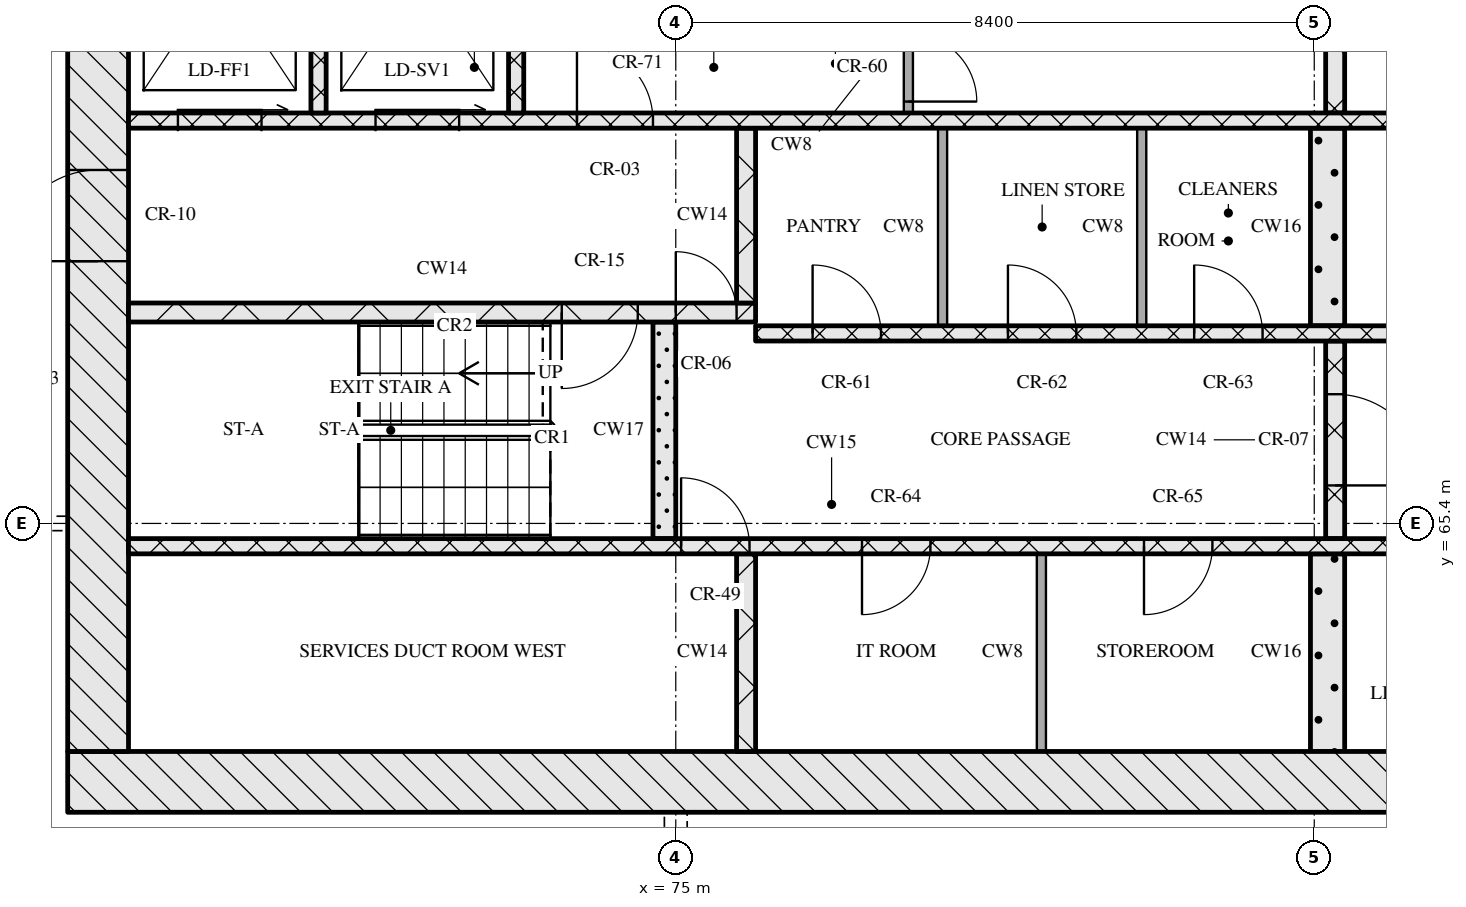
"""IFC4 building model, lengths in metres.
Left out: names, types, materials, properties, quantities, classifications, styles, units other than length and angle.
Written with IfcOpenShell. Run it as: python <this file> out.ifc"""

import sys

from ifc_helpers import new_model, si_unit, direction, frame, frame_2d, origin, place, context, subcontext, project, spatial, rectangle, extrude, element, fill, save


model = new_model("IFC4")
c1 = context("Model", 3, precision=1e-05, world=origin(), true_north=direction((0.0, 1.0)))
c2 = subcontext(c1, "Body", "Model", "MODEL_VIEW")
j1 = project(units=[si_unit("LENGTHUNIT", "METRE"), si_unit("PLANEANGLEUNIT", "RADIAN")], contexts=[c1])
p1 = place(None, origin())
s1 = spatial("IfcSite", under=j1, at=p1, CompositionType="ELEMENT")
p2 = place(p1, origin())
s2 = spatial("IfcBuilding", under=s1, at=p2, CompositionType="ELEMENT")
p3 = place(p2, frame((0.0, 0.0, 179.85)))
s3 = spatial("IfcBuildingStorey", under=s2, at=p3, CompositionType="ELEMENT", Elevation=179.85)
p4 = place(p3, frame((67.0, 62.0, 0.0), z_axis=(0.0, 0.0, 1.0), x_axis=(1.0, 0.0, 0.0)))
e1 = element("IfcWall", 1, at=p4, inside=s3, PredefinedType="SOLIDWALL", context=c2, shape_type="SweptSolid", body=[
    extrude(rectangle(XDim=41.2, YDim=0.8, at=frame_2d((20.6, 0.0))), origin(), (0.0, 0.0, 1.0), 3.32),
])
p5 = place(p4, frame((20.95, 0.0, 0.0)))
e2 = element("IfcOpeningElement", 2, at=p5, cuts=e1, PredefinedType="OPENING", context=c2, shape_type="SweptSolid", body=[
    extrude(rectangle(XDim=1.8, YDim=2.1, at=frame_2d((0.9, 1.05))), frame((0.0, 0.41, 0.0), z_axis=(0.0, -1.0, 0.0), x_axis=(1.0, 0.0, 0.0)), (0.0, 0.0, 1.0), 0.82),
])
p6 = place(p3, frame((67.4, 62.4, 0.0), z_axis=(0.0, 0.0, 1.0), x_axis=(0.0, 1.0, 0.0)))
e3 = element("IfcWall", 3, at=p6, inside=s3, PredefinedType="SOLIDWALL", context=c2, shape_type="SweptSolid", body=[
    extrude(rectangle(XDim=12.0, YDim=0.8, at=frame_2d((6.0, 0.0))), origin(), (0.0, 0.0, 1.0), 3.32),
])
p7 = place(p6, frame((6.45, 0.0, 0.0)))
e4 = element("IfcOpeningElement", 4, at=p7, cuts=e3, PredefinedType="OPENING", context=c2, shape_type="SweptSolid", body=[
    extrude(rectangle(XDim=1.2, YDim=2.1, at=frame_2d((0.6, 1.05))), frame((0.0, 0.41, 0.0), z_axis=(0.0, -1.0, 0.0), x_axis=(1.0, 0.0, 0.0)), (0.0, 0.0, 1.0), 0.82),
])
p8 = place(p3, frame((75.925, 62.4, 0.0), z_axis=(0.0, 0.0, 1.0), x_axis=(0.0, 1.0, 0.0)))
e5 = element("IfcWall", 5, at=p8, inside=s3, PredefinedType="SOLIDWALL", context=c2, shape_type="SweptSolid", body=[
    extrude(rectangle(XDim=2.6, YDim=0.25, at=frame_2d((1.3, 0.0))), origin(), (0.0, 0.0, 1.0), 3.32),
])
p9 = place(p3, frame((79.81, 62.4, 0.0), z_axis=(0.0, 0.0, 1.0), x_axis=(0.0, 1.0, 0.0)))
e6 = element("IfcWall", 6, at=p9, inside=s3, PredefinedType="PARTITIONING", context=c2, shape_type="SweptSolid", body=[
    extrude(rectangle(XDim=2.6, YDim=0.12, at=frame_2d((1.3, 0.0))), origin(), (0.0, 0.0, 1.0), 3.32),
])
p10 = place(p3, frame((83.575, 62.4, 0.0), z_axis=(0.0, 0.0, 1.0), x_axis=(0.0, 1.0, 0.0)))
e7 = element("IfcWall", 7, at=p10, inside=s3, PredefinedType="SOLIDWALL", context=c2, shape_type="SweptSolid", body=[
    extrude(rectangle(XDim=2.6, YDim=0.45, at=frame_2d((1.3, 0.0))), origin(), (0.0, 0.0, 1.0), 3.32),
])
p11 = place(p3, frame((67.8, 65.1, 0.0), z_axis=(0.0, 0.0, 1.0), x_axis=(1.0, 0.0, 0.0)))
e8 = element("IfcWall", 8, at=p11, inside=s3, PredefinedType="SOLIDWALL", context=c2, shape_type="SweptSolid", body=[
    extrude(rectangle(XDim=18.5, YDim=0.2, at=frame_2d((9.25, 0.0))), origin(), (0.0, 0.0, 1.0), 3.32),
])
p12 = place(p11, frame((7.27, 0.0, 0.0)))
e9 = element("IfcOpeningElement", 9, at=p12, cuts=e8, PredefinedType="OPENING", context=c2, shape_type="SweptSolid", body=[
    extrude(rectangle(XDim=0.9, YDim=2.1, at=frame_2d((0.45, 1.05))), frame((0.0, 0.11, 0.0), z_axis=(0.0, -1.0, 0.0), x_axis=(1.0, 0.0, 0.0)), (0.0, 0.0, 1.0), 0.22),
])
p13 = place(p11, frame((9.65, 0.0, 0.0)))
e10 = element("IfcOpeningElement", 10, at=p13, cuts=e8, PredefinedType="OPENING", context=c2, shape_type="SweptSolid", body=[
    extrude(rectangle(XDim=0.9, YDim=2.1, at=frame_2d((0.45, 1.05))), frame((0.0, 0.11, 0.0), z_axis=(0.0, -1.0, 0.0), x_axis=(1.0, 0.0, 0.0)), (0.0, 0.0, 1.0), 0.22),
])
p14 = place(p11, frame((13.36, 0.0, 0.0)))
e11 = element("IfcOpeningElement", 11, at=p14, cuts=e8, PredefinedType="OPENING", context=c2, shape_type="SweptSolid", body=[
    extrude(rectangle(XDim=0.9, YDim=2.1, at=frame_2d((0.45, 1.05))), frame((0.0, 0.11, 0.0), z_axis=(0.0, -1.0, 0.0), x_axis=(1.0, 0.0, 0.0)), (0.0, 0.0, 1.0), 0.22),
])
p15 = place(p11, frame((16.7, 0.0, 0.0)))
e12 = element("IfcOpeningElement", 12, at=p15, cuts=e8, PredefinedType="OPENING", context=c2, shape_type="SweptSolid", body=[
    extrude(rectangle(XDim=0.9, YDim=2.1, at=frame_2d((0.45, 1.05))), frame((0.0, 0.11, 0.0), z_axis=(0.0, -1.0, 0.0), x_axis=(1.0, 0.0, 0.0)), (0.0, 0.0, 1.0), 0.22),
])
p16 = place(p3, frame((74.85, 65.2, 0.0), z_axis=(0.0, 0.0, 1.0), x_axis=(0.0, 1.0, 0.0)))
e13 = element("IfcWall", 13, at=p16, inside=s3, PredefinedType="SOLIDWALL", context=c2, shape_type="SweptSolid", body=[
    extrude(rectangle(XDim=2.85, YDim=0.3, at=frame_2d((1.425, 0.0))), origin(), (0.0, 0.0, 1.0), 3.32),
])
p17 = place(p3, frame((83.675, 65.2, 0.0), z_axis=(0.0, 0.0, 1.0), x_axis=(0.0, 1.0, 0.0)))
e14 = element("IfcWall", 14, at=p17, inside=s3, PredefinedType="SOLIDWALL", context=c2, shape_type="SweptSolid", body=[
    extrude(rectangle(XDim=2.6, YDim=0.25, at=frame_2d((1.3, 0.0))), origin(), (0.0, 0.0, 1.0), 3.32),
])
p18 = place(p17, frame((0.7, 0.0, 0.0)))
e15 = element("IfcOpeningElement", 15, at=p18, cuts=e14, PredefinedType="OPENING", context=c2, shape_type="SweptSolid", body=[
    extrude(rectangle(XDim=1.2, YDim=2.1, at=frame_2d((0.6, 1.05))), frame((0.0, 0.135, 0.0), z_axis=(0.0, -1.0, 0.0), x_axis=(1.0, 0.0, 0.0)), (0.0, 0.0, 1.0), 0.27),
])
p19 = place(p3, frame((76.05, 67.9, 0.0), z_axis=(0.0, 0.0, 1.0), x_axis=(1.0, 0.0, 0.0)))
e16 = element("IfcWall", 16, at=p19, inside=s3, PredefinedType="SOLIDWALL", context=c2, shape_type="SweptSolid", body=[
    extrude(rectangle(XDim=23.1, YDim=0.2, at=frame_2d((11.55, 0.0))), origin(), (0.0, 0.0, 1.0), 3.32),
])
p20 = place(p19, frame((0.75, 0.0, 0.0)))
e17 = element("IfcOpeningElement", 17, at=p20, cuts=e16, PredefinedType="OPENING", context=c2, shape_type="SweptSolid", body=[
    extrude(rectangle(XDim=0.9, YDim=2.1, at=frame_2d((0.45, 1.05))), frame((0.0, 0.11, 0.0), z_axis=(0.0, -1.0, 0.0), x_axis=(1.0, 0.0, 0.0)), (0.0, 0.0, 1.0), 0.22),
])
p21 = place(p19, frame((3.32, 0.0, 0.0)))
e18 = element("IfcOpeningElement", 18, at=p21, cuts=e16, PredefinedType="OPENING", context=c2, shape_type="SweptSolid", body=[
    extrude(rectangle(XDim=0.9, YDim=2.1, at=frame_2d((0.45, 1.05))), frame((0.0, 0.11, 0.0), z_axis=(0.0, -1.0, 0.0), x_axis=(1.0, 0.0, 0.0)), (0.0, 0.0, 1.0), 0.22),
])
p22 = place(p19, frame((5.77, 0.0, 0.0)))
e19 = element("IfcOpeningElement", 19, at=p22, cuts=e16, PredefinedType="OPENING", context=c2, shape_type="SweptSolid", body=[
    extrude(rectangle(XDim=0.9, YDim=2.1, at=frame_2d((0.45, 1.05))), frame((0.0, 0.11, 0.0), z_axis=(0.0, -1.0, 0.0), x_axis=(1.0, 0.0, 0.0)), (0.0, 0.0, 1.0), 0.22),
])
p23 = place(p19, frame((8.45, 0.0, 0.0)))
e20 = element("IfcOpeningElement", 20, at=p23, cuts=e16, PredefinedType="OPENING", context=c2, shape_type="SweptSolid", body=[
    extrude(rectangle(XDim=0.9, YDim=2.1, at=frame_2d((0.45, 1.05))), frame((0.0, 0.11, 0.0), z_axis=(0.0, -1.0, 0.0), x_axis=(1.0, 0.0, 0.0)), (0.0, 0.0, 1.0), 0.22),
])
p24 = place(p19, frame((10.91, 0.0, 0.0)))
e21 = element("IfcOpeningElement", 21, at=p24, cuts=e16, PredefinedType="OPENING", context=c2, shape_type="SweptSolid", body=[
    extrude(rectangle(XDim=0.9, YDim=2.1, at=frame_2d((0.45, 1.05))), frame((0.0, 0.11, 0.0), z_axis=(0.0, -1.0, 0.0), x_axis=(1.0, 0.0, 0.0)), (0.0, 0.0, 1.0), 0.22),
])
p25 = place(p19, frame((13.55, 0.0, 0.0)))
e22 = element("IfcOpeningElement", 22, at=p25, cuts=e16, PredefinedType="OPENING", context=c2, shape_type="SweptSolid", body=[
    extrude(rectangle(XDim=1.0, YDim=2.1, at=frame_2d((0.5, 1.05))), frame((0.0, 0.11, 0.0), z_axis=(0.0, -1.0, 0.0), x_axis=(1.0, 0.0, 0.0)), (0.0, 0.0, 1.0), 0.22),
])
p26 = place(p19, frame((16.2, 0.0, 0.0)))
e23 = element("IfcOpeningElement", 23, at=p26, cuts=e16, PredefinedType="OPENING", context=c2, shape_type="SweptSolid", body=[
    extrude(rectangle(XDim=1.1, YDim=2.1, at=frame_2d((0.55, 1.05))), frame((0.0, 0.11, 0.0), z_axis=(0.0, -1.0, 0.0), x_axis=(1.0, 0.0, 0.0)), (0.0, 0.0, 1.0), 0.22),
])
p27 = place(p19, frame((18.7, 0.0, 0.0)))
e24 = element("IfcOpeningElement", 24, at=p27, cuts=e16, PredefinedType="OPENING", context=c2, shape_type="SweptSolid", body=[
    extrude(rectangle(XDim=1.1, YDim=2.1, at=frame_2d((0.55, 1.05))), frame((0.0, 0.11, 0.0), z_axis=(0.0, -1.0, 0.0), x_axis=(1.0, 0.0, 0.0)), (0.0, 0.0, 1.0), 0.22),
])
p28 = place(p19, frame((21.2, 0.0, 0.0)))
e25 = element("IfcOpeningElement", 25, at=p28, cuts=e16, PredefinedType="OPENING", context=c2, shape_type="SweptSolid", body=[
    extrude(rectangle(XDim=1.1, YDim=2.1, at=frame_2d((0.55, 1.05))), frame((0.0, 0.11, 0.0), z_axis=(0.0, -1.0, 0.0), x_axis=(1.0, 0.0, 0.0)), (0.0, 0.0, 1.0), 0.22),
])
for number, where, z_axis, x_axis in (
    (26, (78.51, 68.0, 0.0), (0.0, 0.0, 1.0), (0.0, 1.0, 0.0)),
    (27, (81.13, 68.0, 0.0), (0.0, 0.0, 1.0), (0.0, 1.0, 0.0)),
):
    element("IfcWall", number, at=place(p3, frame(where, z_axis=z_axis, x_axis=x_axis)), inside=s3, PredefinedType="PARTITIONING", context=c2, shape_type="SweptSolid", body=[
        extrude(rectangle(XDim=2.6, YDim=0.12, at=frame_2d((1.3, 0.0))), origin(), (0.0, 0.0, 1.0), 3.32),
    ])
p29 = place(p3, frame((83.575, 68.0, 0.0), z_axis=(0.0, 0.0, 1.0), x_axis=(0.0, 1.0, 0.0)))
e28 = element("IfcWall", 28, at=p29, inside=s3, PredefinedType="SOLIDWALL", context=c2, shape_type="SweptSolid", body=[
    extrude(rectangle(XDim=2.6, YDim=0.45, at=frame_2d((1.3, 0.0))), origin(), (0.0, 0.0, 1.0), 3.32),
])
p30 = place(p3, frame((67.8, 68.175, 0.0), z_axis=(0.0, 0.0, 1.0), x_axis=(1.0, 0.0, 0.0)))
e29 = element("IfcWall", 29, at=p30, inside=s3, PredefinedType="SOLIDWALL", context=c2, shape_type="SweptSolid", body=[
    extrude(rectangle(XDim=8.25, YDim=0.25, at=frame_2d((4.125, 0.0))), origin(), (0.0, 0.0, 1.0), 3.32),
])
p31 = place(p30, frame((5.7, 0.0, 0.0)))
e30 = element("IfcOpeningElement", 30, at=p31, cuts=e29, PredefinedType="OPENING", context=c2, shape_type="SweptSolid", body=[
    extrude(rectangle(XDim=1.0, YDim=2.1, at=frame_2d((0.5, 1.05))), frame((0.0, 0.135, 0.0), z_axis=(0.0, -1.0, 0.0), x_axis=(1.0, 0.0, 0.0)), (0.0, 0.0, 1.0), 0.27),
])
p32 = place(p30, frame((7.2, 0.0, 0.0)))
e31 = element("IfcOpeningElement", 31, at=p32, cuts=e29, PredefinedType="OPENING", context=c2, shape_type="SweptSolid", body=[
    extrude(rectangle(XDim=0.8, YDim=2.1, at=frame_2d((0.4, 1.05))), frame((0.0, 0.135, 0.0), z_axis=(0.0, -1.0, 0.0), x_axis=(1.0, 0.0, 0.0)), (0.0, 0.0, 1.0), 0.27),
])
p33 = place(p3, frame((75.925, 68.3, 0.0), z_axis=(0.0, 0.0, 1.0), x_axis=(0.0, 1.0, 0.0)))
e32 = element("IfcWall", 32, at=p33, inside=s3, PredefinedType="SOLIDWALL", context=c2, shape_type="SweptSolid", body=[
    extrude(rectangle(XDim=2.3, YDim=0.25, at=frame_2d((1.15, 0.0))), origin(), (0.0, 0.0, 1.0), 3.32),
])
p34 = place(p3, frame((67.8, 70.7, 0.0), z_axis=(0.0, 0.0, 1.0), x_axis=(1.0, 0.0, 0.0)))
e33 = element("IfcWall", 33, at=p34, inside=s3, PredefinedType="SOLIDWALL", context=c2, shape_type="SweptSolid", body=[
    extrude(rectangle(XDim=39.6, YDim=0.2, at=frame_2d((19.8, 0.0))), origin(), (0.0, 0.0, 1.0), 3.32),
])
p35 = place(p34, frame((0.65, 0.0, 0.0)))
e34 = element("IfcOpeningElement", 34, at=p35, cuts=e33, PredefinedType="OPENING", context=c2, shape_type="SweptSolid", body=[
    extrude(rectangle(XDim=1.1, YDim=2.1, at=frame_2d((0.55, 1.05))), frame((0.0, 0.11, 0.0), z_axis=(0.0, -1.0, 0.0), x_axis=(1.0, 0.0, 0.0)), (0.0, 0.0, 1.0), 0.22),
])
p36 = place(p34, frame((3.25, 0.0, 0.0)))
e35 = element("IfcOpeningElement", 35, at=p36, cuts=e33, PredefinedType="OPENING", context=c2, shape_type="SweptSolid", body=[
    extrude(rectangle(XDim=1.1, YDim=2.1, at=frame_2d((0.55, 1.05))), frame((0.0, 0.11, 0.0), z_axis=(0.0, -1.0, 0.0), x_axis=(1.0, 0.0, 0.0)), (0.0, 0.0, 1.0), 0.22),
])
p37 = place(p34, frame((5.9, 0.0, 0.0)))
e36 = element("IfcOpeningElement", 36, at=p37, cuts=e33, PredefinedType="OPENING", context=c2, shape_type="SweptSolid", body=[
    extrude(rectangle(XDim=1.0, YDim=2.1, at=frame_2d((0.5, 1.05))), frame((0.0, 0.11, 0.0), z_axis=(0.0, -1.0, 0.0), x_axis=(1.0, 0.0, 0.0)), (0.0, 0.0, 1.0), 0.22),
])
p38 = place(p34, frame((21.7, 0.0, 0.0)))
e37 = element("IfcOpeningElement", 37, at=p38, cuts=e33, PredefinedType="OPENING", context=c2, shape_type="SweptSolid", body=[
    extrude(rectangle(XDim=1.0, YDim=2.1, at=frame_2d((0.5, 1.05))), frame((0.0, 0.11, 0.0), z_axis=(0.0, -1.0, 0.0), x_axis=(1.0, 0.0, 0.0)), (0.0, 0.0, 1.0), 0.22),
])
p39 = place(p34, frame((32.7, 0.0, 0.0)))
e38 = element("IfcOpeningElement", 38, at=p39, cuts=e33, PredefinedType="OPENING", context=c2, shape_type="SweptSolid", body=[
    extrude(rectangle(XDim=1.0, YDim=2.1, at=frame_2d((0.5, 1.05))), frame((0.0, 0.11, 0.0), z_axis=(0.0, -1.0, 0.0), x_axis=(1.0, 0.0, 0.0)), (0.0, 0.0, 1.0), 0.22),
])
p40 = place(p34, frame((35.25, 0.0, 0.0)))
e39 = element("IfcOpeningElement", 39, at=p40, cuts=e33, PredefinedType="OPENING", context=c2, shape_type="SweptSolid", body=[
    extrude(rectangle(XDim=1.1, YDim=2.1, at=frame_2d((0.55, 1.05))), frame((0.0, 0.11, 0.0), z_axis=(0.0, -1.0, 0.0), x_axis=(1.0, 0.0, 0.0)), (0.0, 0.0, 1.0), 0.22),
])
p41 = place(p34, frame((37.85, 0.0, 0.0)))
e40 = element("IfcOpeningElement", 40, at=p41, cuts=e33, PredefinedType="OPENING", context=c2, shape_type="SweptSolid", body=[
    extrude(rectangle(XDim=1.1, YDim=2.1, at=frame_2d((0.55, 1.05))), frame((0.0, 0.11, 0.0), z_axis=(0.0, -1.0, 0.0), x_axis=(1.0, 0.0, 0.0)), (0.0, 0.0, 1.0), 0.22),
])
p42 = place(p3, frame((70.3, 70.8, 0.0), z_axis=(0.0, 0.0, 1.0), x_axis=(0.0, 1.0, 0.0)))
e41 = element("IfcWall", 41, at=p42, inside=s3, PredefinedType="SOLIDWALL", context=c2, shape_type="SweptSolid", body=[
    extrude(rectangle(XDim=3.6, YDim=0.2, at=frame_2d((1.8, 0.0))), origin(), (0.0, 0.0, 1.0), 3.32),
])
p43 = place(p3, frame((72.9, 70.8, 0.0), z_axis=(0.0, 0.0, 1.0), x_axis=(0.0, 1.0, 0.0)))
e42 = element("IfcWall", 42, at=p43, inside=s3, PredefinedType="SOLIDWALL", context=c2, shape_type="SweptSolid", body=[
    extrude(rectangle(XDim=1.2, YDim=0.2, at=frame_2d((0.6, 0.0))), origin(), (0.0, 0.0, 1.0), 3.32),
])
p44 = place(p3, frame((78.06, 70.8, 0.0), z_axis=(0.0, 0.0, 1.0), x_axis=(0.0, 1.0, 0.0)))
e43 = element("IfcWall", 43, at=p44, inside=s3, PredefinedType="PARTITIONING", context=c2, shape_type="SweptSolid", body=[
    extrude(rectangle(XDim=1.2, YDim=0.12, at=frame_2d((0.6, 0.0))), origin(), (0.0, 0.0, 1.0), 3.32),
])
p45 = place(p44, frame((0.15, 0.0, 0.0)))
e44 = element("IfcOpeningElement", 44, at=p45, cuts=e43, PredefinedType="OPENING", context=c2, shape_type="SweptSolid", body=[
    extrude(rectangle(XDim=0.9, YDim=2.1, at=frame_2d((0.45, 1.05))), frame((0.0, 0.07, 0.0), z_axis=(0.0, -1.0, 0.0), x_axis=(1.0, 0.0, 0.0)), (0.0, 0.0, 1.0), 0.14),
])
p46 = place(p3, frame((83.675, 70.8, 0.0), z_axis=(0.0, 0.0, 1.0), x_axis=(0.0, 1.0, 0.0)))
e45 = element("IfcWall", 45, at=p46, inside=s3, PredefinedType="SOLIDWALL", context=c2, shape_type="SweptSolid", body=[
    extrude(rectangle(XDim=2.95, YDim=0.25, at=frame_2d((1.475, 0.0))), origin(), (0.0, 0.0, 1.0), 3.32),
])
p47 = place(p12, origin())
e46 = element("IfcDoor", 46, at=p47, inside=s3, OperationType="SINGLE_SWING_LEFT", PredefinedType="DOOR", context=c2, shape_type="SweptSolid", body=[
    extrude(rectangle(XDim=0.9, YDim=2.1, at=frame_2d((0.45, 1.05))), frame((0.0, 0.025, 0.0), z_axis=(0.0, -1.0, 0.0), x_axis=(1.0, 0.0, 0.0)), (0.0, 0.0, 1.0), 0.05),
])
fill(e9, e46)
p48 = place(p13, origin())
e47 = element("IfcDoor", 47, at=p48, inside=s3, OperationType="SINGLE_SWING_RIGHT", PredefinedType="DOOR", context=c2, shape_type="SweptSolid", body=[
    extrude(rectangle(XDim=0.9, YDim=2.1, at=frame_2d((0.45, 1.05))), frame((0.0, 0.025, 0.0), z_axis=(0.0, -1.0, 0.0), x_axis=(1.0, 0.0, 0.0)), (0.0, 0.0, 1.0), 0.05),
])
fill(e10, e47)
p49 = place(p14, origin())
e48 = element("IfcDoor", 48, at=p49, inside=s3, OperationType="SINGLE_SWING_RIGHT", PredefinedType="DOOR", context=c2, shape_type="SweptSolid", body=[
    extrude(rectangle(XDim=0.9, YDim=2.1, at=frame_2d((0.45, 1.05))), frame((0.0, 0.025, 0.0), z_axis=(0.0, -1.0, 0.0), x_axis=(1.0, 0.0, 0.0)), (0.0, 0.0, 1.0), 0.05),
])
fill(e11, e48)
p50 = place(p18, origin())
e49 = element("IfcDoor", 49, at=p50, inside=s3, OperationType="SINGLE_SWING_RIGHT", PredefinedType="DOOR", context=c2, shape_type="SweptSolid", body=[
    extrude(rectangle(XDim=1.2, YDim=2.1, at=frame_2d((0.6, 1.05))), frame((0.0, 0.025, 0.0), z_axis=(0.0, -1.0, 0.0), x_axis=(1.0, 0.0, 0.0)), (0.0, 0.0, 1.0), 0.05),
])
fill(e15, e49)
p51 = place(p20, origin())
e50 = element("IfcDoor", 50, at=p51, inside=s3, OperationType="SINGLE_SWING_LEFT", PredefinedType="DOOR", context=c2, shape_type="SweptSolid", body=[
    extrude(rectangle(XDim=0.9, YDim=2.1, at=frame_2d((0.45, 1.05))), frame((0.0, 0.025, 0.0), z_axis=(0.0, -1.0, 0.0), x_axis=(1.0, 0.0, 0.0)), (0.0, 0.0, 1.0), 0.05),
])
fill(e17, e50)
p52 = place(p21, origin())
e51 = element("IfcDoor", 51, at=p52, inside=s3, OperationType="SINGLE_SWING_LEFT", PredefinedType="DOOR", context=c2, shape_type="SweptSolid", body=[
    extrude(rectangle(XDim=0.9, YDim=2.1, at=frame_2d((0.45, 1.05))), frame((0.0, 0.025, 0.0), z_axis=(0.0, -1.0, 0.0), x_axis=(1.0, 0.0, 0.0)), (0.0, 0.0, 1.0), 0.05),
])
fill(e18, e51)
p53 = place(p22, origin())
e52 = element("IfcDoor", 52, at=p53, inside=s3, OperationType="SINGLE_SWING_LEFT", PredefinedType="DOOR", context=c2, shape_type="SweptSolid", body=[
    extrude(rectangle(XDim=0.9, YDim=2.1, at=frame_2d((0.45, 1.05))), frame((0.0, 0.025, 0.0), z_axis=(0.0, -1.0, 0.0), x_axis=(1.0, 0.0, 0.0)), (0.0, 0.0, 1.0), 0.05),
])
fill(e19, e52)
p54 = place(p31, origin())
e53 = element("IfcDoor", 53, at=p54, inside=s3, OperationType="SINGLE_SWING_RIGHT", PredefinedType="DOOR", context=c2, shape_type="SweptSolid", body=[
    extrude(rectangle(XDim=1.0, YDim=2.1, at=frame_2d((0.5, 1.05))), frame((0.0, 0.025, 0.0), z_axis=(0.0, -1.0, 0.0), x_axis=(1.0, 0.0, 0.0)), (0.0, 0.0, 1.0), 0.05),
])
fill(e30, e53)
p55 = place(p32, origin())
e54 = element("IfcDoor", 54, at=p55, inside=s3, OperationType="SINGLE_SWING_LEFT", PredefinedType="DOOR", context=c2, shape_type="SweptSolid", body=[
    extrude(rectangle(XDim=0.8, YDim=2.1, at=frame_2d((0.4, 1.05))), frame((0.0, 0.025, 0.0), z_axis=(0.0, -1.0, 0.0), x_axis=(1.0, 0.0, 0.0)), (0.0, 0.0, 1.0), 0.05),
])
fill(e31, e54)
p56 = place(p7, origin())
e55 = element("IfcDoor", 55, at=p56, inside=s3, OperationType="SINGLE_SWING_LEFT", PredefinedType="DOOR", context=c2, shape_type="SweptSolid", body=[
    extrude(rectangle(XDim=1.2, YDim=2.1, at=frame_2d((0.6, 1.05))), frame((0.0, 0.025, 0.0), z_axis=(0.0, -1.0, 0.0), x_axis=(1.0, 0.0, 0.0)), (0.0, 0.0, 1.0), 0.05),
])
fill(e4, e55)
p57 = place(p35, origin())
e56 = element("IfcDoor", 56, at=p57, inside=s3, OperationType="SLIDING_TO_RIGHT", PredefinedType="DOOR", context=c2, shape_type="SweptSolid", body=[
    extrude(rectangle(XDim=1.1, YDim=2.1, at=frame_2d((0.55, 1.05))), frame((0.0, 0.025, 0.0), z_axis=(0.0, -1.0, 0.0), x_axis=(1.0, 0.0, 0.0)), (0.0, 0.0, 1.0), 0.05),
])
fill(e34, e56)
p58 = place(p36, origin())
e57 = element("IfcDoor", 57, at=p58, inside=s3, OperationType="SLIDING_TO_RIGHT", PredefinedType="DOOR", context=c2, shape_type="SweptSolid", body=[
    extrude(rectangle(XDim=1.1, YDim=2.1, at=frame_2d((0.55, 1.05))), frame((0.0, 0.025, 0.0), z_axis=(0.0, -1.0, 0.0), x_axis=(1.0, 0.0, 0.0)), (0.0, 0.0, 1.0), 0.05),
])
fill(e35, e57)
p59 = place(p37, origin())
e58 = element("IfcDoor", 58, at=p59, inside=s3, OperationType="SINGLE_SWING_LEFT", PredefinedType="DOOR", context=c2, shape_type="SweptSolid", body=[
    extrude(rectangle(XDim=1.0, YDim=2.1, at=frame_2d((0.5, 1.05))), frame((0.0, 0.025, 0.0), z_axis=(0.0, -1.0, 0.0), x_axis=(1.0, 0.0, 0.0)), (0.0, 0.0, 1.0), 0.05),
])
fill(e36, e58)
p60 = place(p45, origin())
e59 = element("IfcDoor", 59, at=p60, inside=s3, OperationType="SINGLE_SWING_RIGHT", PredefinedType="DOOR", context=c2, shape_type="SweptSolid", body=[
    extrude(rectangle(XDim=0.9, YDim=2.1, at=frame_2d((0.45, 1.05))), frame((0.0, 0.025, 0.0), z_axis=(0.0, -1.0, 0.0), x_axis=(1.0, 0.0, 0.0)), (0.0, 0.0, 1.0), 0.05),
])
fill(e44, e59)
save(model, sys.argv[1])
